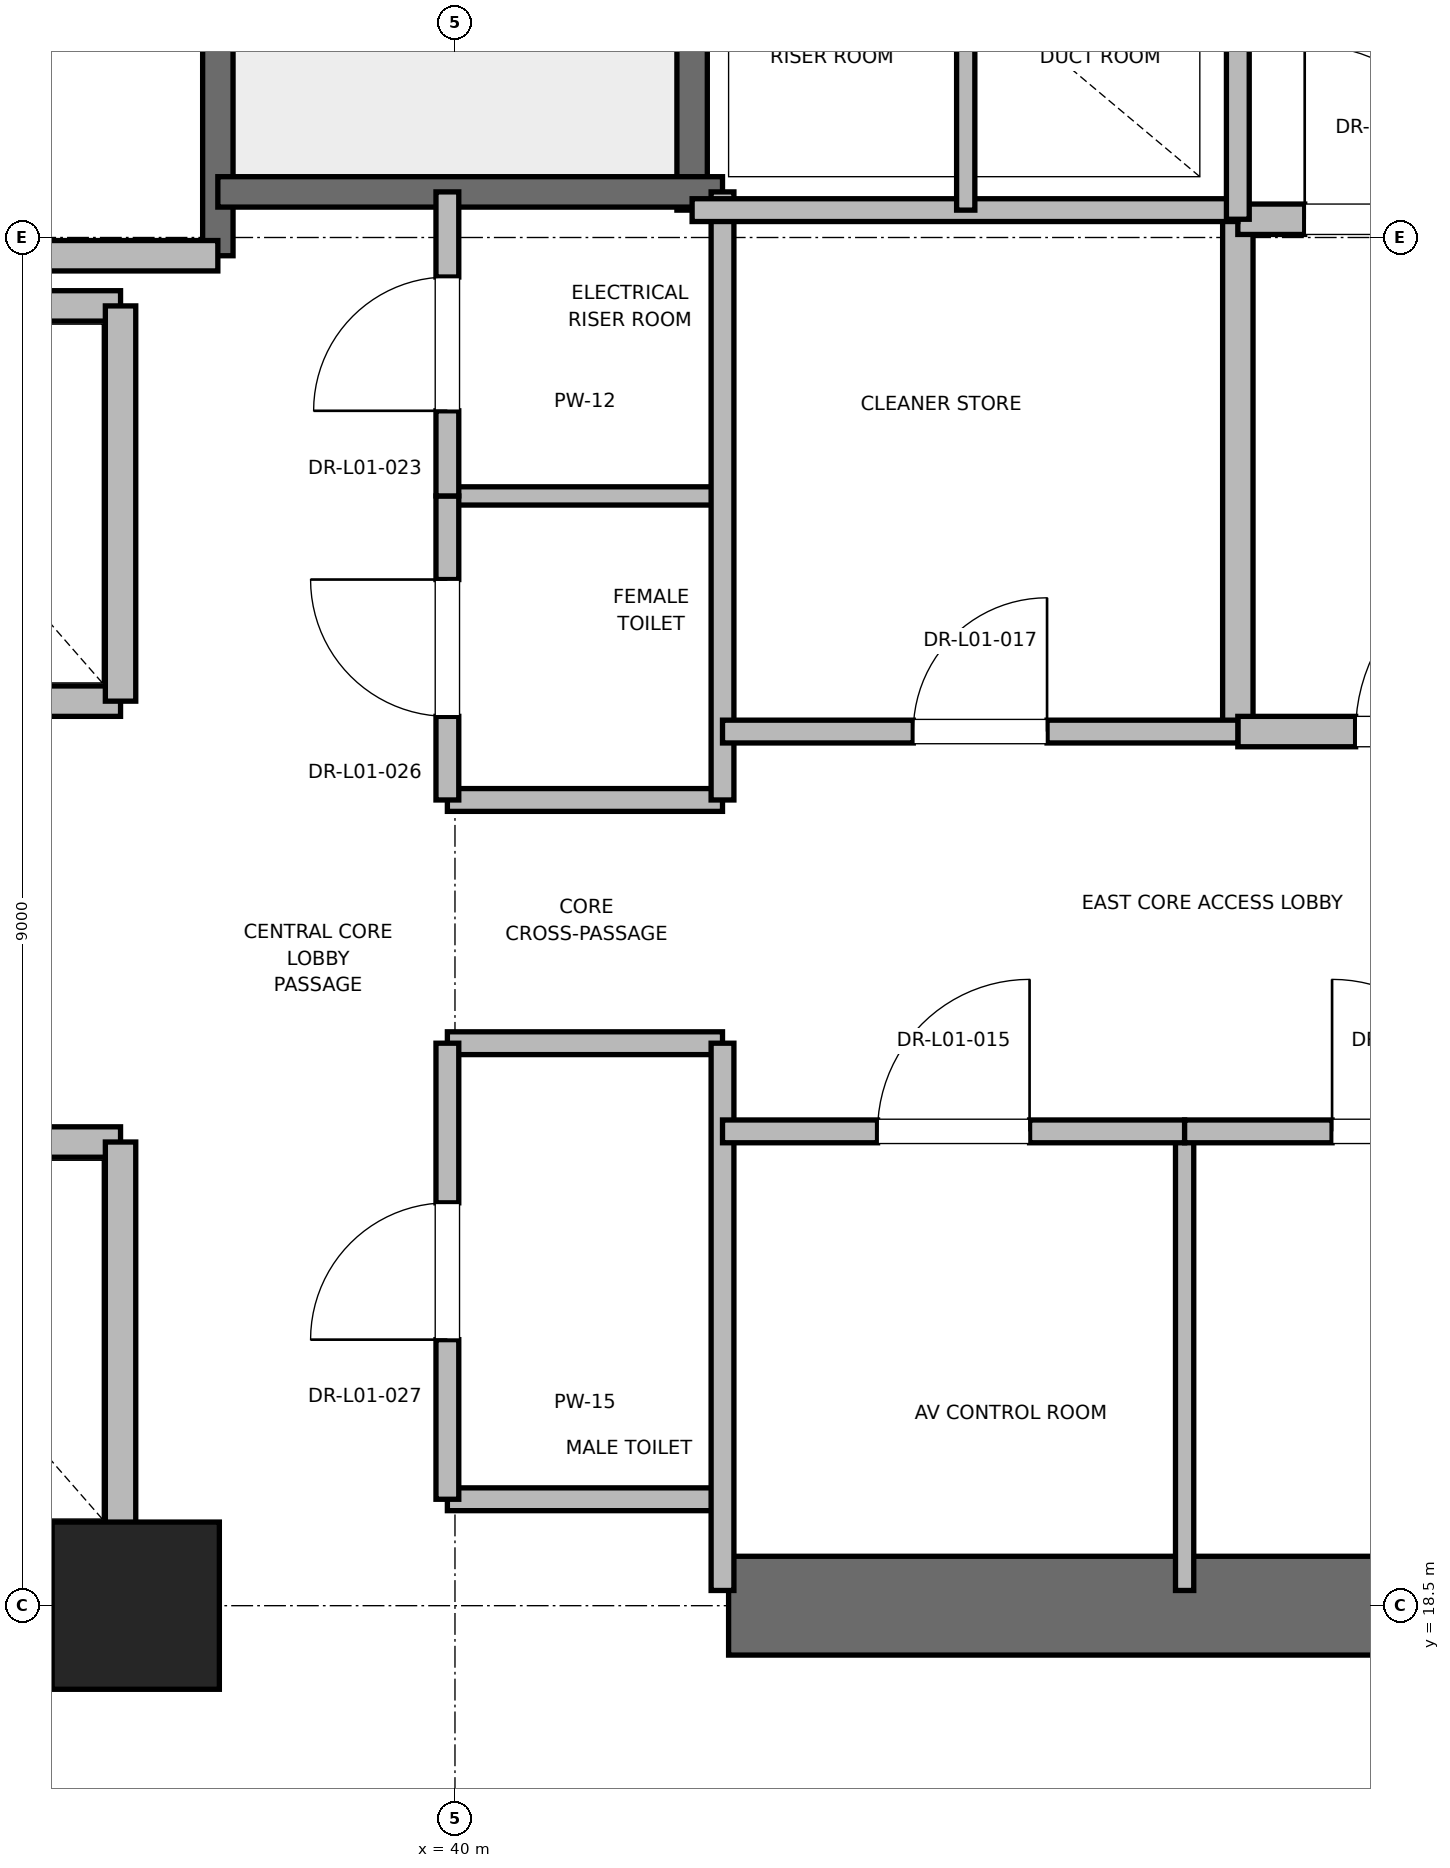
"""IFC4 building model, lengths in metres.
Left out: names, types, materials, properties, quantities, classifications, styles, units other than length and angle.
Written with IfcOpenShell. Run it as: python <this file> out.ifc"""

import sys

from ifc_helpers import new_model, si_unit, direction, frame, frame_2d, origin, origin_2d, place, context, subcontext, project, spatial, rectangle, extrude, element, fill, save


model = new_model("IFC4")
c1 = context("Model", 3, precision=1e-05, world=origin(), true_north=direction((0.0, 1.0)))
c2 = subcontext(c1, "Body", "Model", "MODEL_VIEW")
j1 = project(units=[si_unit("LENGTHUNIT", "METRE"), si_unit("PLANEANGLEUNIT", "RADIAN")], contexts=[c1])
p1 = place(None, origin())
s1 = spatial("IfcSite", under=j1, at=p1, CompositionType="ELEMENT")
p2 = place(p1, origin())
s2 = spatial("IfcBuilding", under=s1, at=p2, CompositionType="ELEMENT")
p3 = place(p2, frame((0.0, 0.0, 6.0)))
s3 = spatial("IfcBuildingStorey", under=s2, at=p3, CompositionType="ELEMENT", Elevation=6.0)
p4 = place(p3, frame((37.9, 18.5, 0.0), z_axis=(0.0, 0.0, 1.0), x_axis=(1.0, 0.0, 0.0)))
e1 = element("IfcColumn", 1, at=p4, inside=s3, PredefinedType="PILASTER", context=c2, shape_type="SweptSolid", body=[
    extrude(rectangle(XDim=1.1, YDim=1.1, at=origin_2d()), origin(), (0.0, 0.0, 1.0), 5.2),
])
for number, where, z_axis, x_axis in (
    (2, (29.0, 18.5, 0.0), (0.0, 0.0, 1.0), (1.0, 0.0, 0.0)),
    (3, (41.8, 18.5, 0.0), (0.0, 0.0, 1.0), (1.0, 0.0, 0.0)),
):
    element("IfcWall", number, at=place(p3, frame(where, z_axis=z_axis, x_axis=x_axis)), inside=s3, PredefinedType="SHEAR", context=c2, shape_type="SweptSolid", body=[
        extrude(rectangle(XDim=9.2, YDim=0.65, at=frame_2d((4.6, 0.0))), origin(), (0.0, 0.0, 1.0), 4.92),
    ])
p5 = place(p3, frame((38.44, 27.38, 0.0), z_axis=(0.0, 0.0, 1.0), x_axis=(0.0, 1.0, 0.0)))
e4 = element("IfcWall", 4, at=p5, inside=s3, PredefinedType="SOLIDWALL", context=c2, shape_type="SweptSolid", body=[
    extrude(rectangle(XDim=8.87, YDim=0.2, at=frame_2d((4.435, 0.0))), origin(), (0.0, 0.0, 1.0), 4.92),
])
p6 = place(p3, frame((41.56, 27.68, 0.0), z_axis=(0.0, 0.0, 1.0), x_axis=(0.0, 1.0, 0.0)))
e5 = element("IfcWall", 5, at=p6, inside=s3, PredefinedType="SOLIDWALL", context=c2, shape_type="SweptSolid", body=[
    extrude(rectangle(XDim=8.57, YDim=0.2, at=frame_2d((4.285, 0.0))), origin(), (0.0, 0.0, 1.0), 4.92),
])
p7 = place(p3, frame((38.44, 27.8, 0.0), z_axis=(0.0, 0.0, 1.0), x_axis=(1.0, 0.0, 0.0)))
e6 = element("IfcWall", 6, at=p7, inside=s3, PredefinedType="SOLIDWALL", context=c2, shape_type="SweptSolid", body=[
    extrude(rectangle(XDim=3.32, YDim=0.2, at=frame_2d((1.66, 0.0))), origin(), (0.0, 0.0, 1.0), 4.92),
])
p8 = place(p3, frame((32.82, 27.38, 0.0), z_axis=(0.0, 0.0, 1.0), x_axis=(1.0, 0.0, 0.0)))
e7 = element("IfcWall", 7, at=p8, inside=s3, PredefinedType="PARTITIONING", context=c2, shape_type="SweptSolid", body=[
    extrude(rectangle(XDim=5.62, YDim=0.2, at=frame_2d((2.81, 0.0))), origin(), (0.0, 0.0, 1.0), 4.92),
])
p9 = place(p3, frame((45.15, 24.25, 0.0), z_axis=(0.0, 0.0, 1.0), x_axis=(0.0, 1.0, 0.0)))
e8 = element("IfcWall", 8, at=p9, inside=s3, PredefinedType="PARTITIONING", context=c2, shape_type="SweptSolid", body=[
    extrude(rectangle(XDim=3.37, YDim=0.2, at=frame_2d((1.685, 0.0))), origin(), (0.0, 0.0, 1.0), 4.92),
])
p10 = place(p3, frame((45.15, 24.25, 0.0), z_axis=(0.0, 0.0, 1.0), x_axis=(1.0, 0.0, 0.0)))
e9 = element("IfcWall", 9, at=p10, inside=s3, PredefinedType="PARTITIONING", context=c2, shape_type="SweptSolid", body=[
    extrude(rectangle(XDim=2.7, YDim=0.2, at=frame_2d((1.35, 0.0))), origin(), (0.0, 0.0, 1.0), 4.92),
])
p11 = place(p10, frame((0.775, 0.0, 0.0)))
e10 = element("IfcOpeningElement", 10, at=p11, cuts=e9, PredefinedType="OPENING", context=c2, shape_type="SweptSolid", body=[
    extrude(rectangle(XDim=1.15, YDim=2.2, at=frame_2d((0.575, 1.1))), frame((0.0, 0.1, 0.0), z_axis=(0.0, -1.0, 0.0), x_axis=(1.0, 0.0, 0.0)), (0.0, 0.0, 1.0), 0.2),
])
p12 = place(p3, frame((45.15, 27.62, 0.0), z_axis=(0.0, 0.0, 1.0), x_axis=(1.0, 0.0, 0.0)))
e11 = element("IfcWall", 11, at=p12, inside=s3, PredefinedType="PARTITIONING", context=c2, shape_type="SweptSolid", body=[
    extrude(rectangle(XDim=2.03, YDim=0.2, at=frame_2d((1.015, 0.0))), origin(), (0.0, 0.0, 1.0), 4.92),
])
p13 = place(p12, frame((0.44, 0.0, 0.0)))
e12 = element("IfcOpeningElement", 12, at=p13, cuts=e11, PredefinedType="OPENING", context=c2, shape_type="SweptSolid", body=[
    extrude(rectangle(XDim=1.15, YDim=2.2, at=frame_2d((0.575, 1.1))), frame((0.0, 0.1, 0.0), z_axis=(0.0, -1.0, 0.0), x_axis=(1.0, 0.0, 0.0)), (0.0, 0.0, 1.0), 0.2),
])
p14 = place(p3, frame((35.5, 18.95, 0.0), z_axis=(0.0, 0.0, 1.0), x_axis=(1.0, 0.0, 0.0)))
e13 = element("IfcWall", 13, at=p14, inside=s3, PredefinedType="SOLIDWALL", context=c2, shape_type="SweptSolid", body=[
    extrude(rectangle(XDim=2.3, YDim=0.2, at=frame_2d((1.15, 0.0))), origin(), (0.0, 0.0, 1.0), 3.7),
])
p15 = place(p3, frame((37.8, 21.55, 0.0), z_axis=(0.0, 0.0, 1.0), x_axis=(-1.0, 0.0, 0.0)))
e14 = element("IfcWall", 14, at=p15, inside=s3, PredefinedType="SOLIDWALL", context=c2, shape_type="SweptSolid", body=[
    extrude(rectangle(XDim=2.3, YDim=0.2, at=frame_2d((1.15, 0.0))), origin(), (0.0, 0.0, 1.0), 4.92),
])
p16 = place(p3, frame((37.8, 18.95, 0.0), z_axis=(0.0, 0.0, 1.0), x_axis=(0.0, 1.0, 0.0)))
e15 = element("IfcWall", 15, at=p16, inside=s3, PredefinedType="SOLIDWALL", context=c2, shape_type="SweptSolid", body=[
    extrude(rectangle(XDim=2.6, YDim=0.2, at=frame_2d((1.3, 0.0))), origin(), (0.0, 0.0, 1.0), 3.7),
])
for number, where, z_axis, x_axis in (
    (16, (35.5, 24.45, 0.0), (0.0, 0.0, 1.0), (1.0, 0.0, 0.0)),
    (17, (37.8, 27.05, 0.0), (0.0, 0.0, 1.0), (-1.0, 0.0, 0.0)),
):
    element("IfcWall", number, at=place(p3, frame(where, z_axis=z_axis, x_axis=x_axis)), inside=s3, PredefinedType="SOLIDWALL", context=c2, shape_type="SweptSolid", body=[
        extrude(rectangle(XDim=2.3, YDim=0.2, at=frame_2d((1.15, 0.0))), origin(), (0.0, 0.0, 1.0), 4.92),
    ])
p17 = place(p3, frame((37.8, 24.45, 0.0), z_axis=(0.0, 0.0, 1.0), x_axis=(0.0, 1.0, 0.0)))
e18 = element("IfcWall", 18, at=p17, inside=s3, PredefinedType="SOLIDWALL", context=c2, shape_type="SweptSolid", body=[
    extrude(rectangle(XDim=2.6, YDim=0.2, at=frame_2d((1.3, 0.0))), origin(), (0.0, 0.0, 1.0), 4.92),
])
for number, where, z_axis, x_axis in (
    (19, (39.95, 19.2, 0.0), (0.0, 0.0, 1.0), (1.0, 0.0, 0.0)),
    (20, (39.95, 22.2, 0.0), (0.0, 0.0, 1.0), (1.0, 0.0, 0.0)),
    (21, (39.95, 23.8, 0.0), (0.0, 0.0, 1.0), (1.0, 0.0, 0.0)),
):
    element("IfcWall", number, at=place(p3, frame(where, z_axis=z_axis, x_axis=x_axis)), inside=s3, PredefinedType="PARTITIONING", context=c2, shape_type="SweptSolid", body=[
        extrude(rectangle(XDim=1.81, YDim=0.15, at=frame_2d((0.905, 0.0))), origin(), (0.0, 0.0, 1.0), 2.85),
    ])
p18 = place(p3, frame((39.95, 25.8, 0.0), z_axis=(0.0, 0.0, 1.0), x_axis=(1.0, 0.0, 0.0)))
e22 = element("IfcWall", 22, at=p18, inside=s3, PredefinedType="PARTITIONING", context=c2, shape_type="SweptSolid", body=[
    extrude(rectangle(XDim=1.81, YDim=0.12, at=frame_2d((0.905, 0.0))), origin(), (0.0, 0.0, 1.0), 2.85),
])
p19 = place(p3, frame((41.76, 18.6, 0.0), z_axis=(0.0, 0.0, 1.0), x_axis=(0.0, 1.0, 0.0)))
e23 = element("IfcWall", 23, at=p19, inside=s3, PredefinedType="PARTITIONING", context=c2, shape_type="SweptSolid", body=[
    extrude(rectangle(XDim=3.6, YDim=0.15, at=frame_2d((1.8, 0.0))), origin(), (0.0, 0.0, 1.0), 2.85),
])
p20 = place(p3, frame((41.76, 23.8, 0.0), z_axis=(0.0, 0.0, 1.0), x_axis=(0.0, 1.0, 0.0)))
e24 = element("IfcWall", 24, at=p20, inside=s3, PredefinedType="PARTITIONING", context=c2, shape_type="SweptSolid", body=[
    extrude(rectangle(XDim=4.0, YDim=0.15, at=frame_2d((2.0, 0.0))), origin(), (0.0, 0.0, 1.0), 2.85),
])
p21 = place(p3, frame((39.95, 19.2, 0.0), z_axis=(0.0, 0.0, 1.0), x_axis=(0.0, 1.0, 0.0)))
e25 = element("IfcWall", 25, at=p21, inside=s3, PredefinedType="PARTITIONING", context=c2, shape_type="SweptSolid", body=[
    extrude(rectangle(XDim=3.0, YDim=0.15, at=frame_2d((1.5, 0.0))), origin(), (0.0, 0.0, 1.0), 2.85),
])
p22 = place(p21, frame((1.05, 0.0, 0.0)))
e26 = element("IfcOpeningElement", 26, at=p22, cuts=e25, PredefinedType="OPENING", context=c2, shape_type="SweptSolid", body=[
    extrude(rectangle(XDim=0.9, YDim=2.1, at=frame_2d((0.45, 1.05))), frame((0.0, 0.075, 0.0), z_axis=(0.0, -1.0, 0.0), x_axis=(1.0, 0.0, 0.0)), (0.0, 0.0, 1.0), 0.15),
])
p23 = place(p3, frame((39.95, 23.8, 0.0), z_axis=(0.0, 0.0, 1.0), x_axis=(0.0, 1.0, 0.0)))
e27 = element("IfcWall", 27, at=p23, inside=s3, PredefinedType="PARTITIONING", context=c2, shape_type="SweptSolid", body=[
    extrude(rectangle(XDim=2.0, YDim=0.15, at=frame_2d((1.0, 0.0))), origin(), (0.0, 0.0, 1.0), 2.85),
])
p24 = place(p23, frame((0.55, 0.0, 0.0)))
e28 = element("IfcOpeningElement", 28, at=p24, cuts=e27, PredefinedType="OPENING", context=c2, shape_type="SweptSolid", body=[
    extrude(rectangle(XDim=0.9, YDim=2.1, at=frame_2d((0.45, 1.05))), frame((0.0, 0.075, 0.0), z_axis=(0.0, -1.0, 0.0), x_axis=(1.0, 0.0, 0.0)), (0.0, 0.0, 1.0), 0.15),
])
p25 = place(p3, frame((39.95, 25.8, 0.0), z_axis=(0.0, 0.0, 1.0), x_axis=(0.0, 1.0, 0.0)))
e29 = element("IfcWall", 29, at=p25, inside=s3, PredefinedType="PARTITIONING", context=c2, shape_type="SweptSolid", body=[
    extrude(rectangle(XDim=2.0, YDim=0.15, at=frame_2d((1.0, 0.0))), origin(), (0.0, 0.0, 1.0), 2.85),
])
p26 = place(p25, frame((0.56, 0.0, 0.0)))
e30 = element("IfcOpeningElement", 30, at=p26, cuts=e29, PredefinedType="OPENING", context=c2, shape_type="SweptSolid", body=[
    extrude(rectangle(XDim=0.88, YDim=2.1, at=frame_2d((0.44, 1.05))), frame((0.0, 0.075, 0.0), z_axis=(0.0, -1.0, 0.0), x_axis=(1.0, 0.0, 0.0)), (0.0, 0.0, 1.0), 0.15),
])
p27 = place(p3, frame((41.56, 27.68, 0.0), z_axis=(0.0, 0.0, 1.0), x_axis=(1.0, 0.0, 0.0)))
e31 = element("IfcWall", 31, at=p27, inside=s3, PredefinedType="PARTITIONING", context=c2, shape_type="SweptSolid", body=[
    extrude(rectangle(XDim=3.59, YDim=0.15, at=frame_2d((1.795, 0.0))), origin(), (0.0, 0.0, 1.0), 2.85),
])
p28 = place(p3, frame((44.8, 18.6, 0.0), z_axis=(0.0, 0.0, 1.0), x_axis=(0.0, 1.0, 0.0)))
e32 = element("IfcWall", 32, at=p28, inside=s3, PredefinedType="PARTITIONING", context=c2, shape_type="SweptSolid", body=[
    extrude(rectangle(XDim=3.02, YDim=0.12, at=frame_2d((1.51, 0.0))), origin(), (0.0, 0.0, 1.0), 2.85),
])
p29 = place(p3, frame((41.76, 21.62, 0.0), z_axis=(0.0, 0.0, 1.0), x_axis=(1.0, 0.0, 0.0)))
e33 = element("IfcWall", 33, at=p29, inside=s3, PredefinedType="PARTITIONING", context=c2, shape_type="SweptSolid", body=[
    extrude(rectangle(XDim=3.04, YDim=0.15, at=frame_2d((1.52, 0.0))), origin(), (0.0, 0.0, 1.0), 2.85),
])
p30 = place(p29, frame((1.02, 0.0, 0.0)))
e34 = element("IfcOpeningElement", 34, at=p30, cuts=e33, PredefinedType="OPENING", context=c2, shape_type="SweptSolid", body=[
    extrude(rectangle(XDim=1.0, YDim=2.15, at=frame_2d((0.5, 1.075))), frame((0.0, 0.075, 0.0), z_axis=(0.0, -1.0, 0.0), x_axis=(1.0, 0.0, 0.0)), (0.0, 0.0, 1.0), 0.15),
])
p31 = place(p3, frame((44.8, 21.62, 0.0), z_axis=(0.0, 0.0, 1.0), x_axis=(1.0, 0.0, 0.0)))
e35 = element("IfcWall", 35, at=p31, inside=s3, PredefinedType="PARTITIONING", context=c2, shape_type="SweptSolid", body=[
    extrude(rectangle(XDim=2.94, YDim=0.15, at=frame_2d((1.47, 0.0))), origin(), (0.0, 0.0, 1.0), 2.85),
])
p32 = place(p31, frame((0.97, 0.0, 0.0)))
e36 = element("IfcOpeningElement", 36, at=p32, cuts=e35, PredefinedType="OPENING", context=c2, shape_type="SweptSolid", body=[
    extrude(rectangle(XDim=1.0, YDim=2.15, at=frame_2d((0.5, 1.075))), frame((0.0, 0.075, 0.0), z_axis=(0.0, -1.0, 0.0), x_axis=(1.0, 0.0, 0.0)), (0.0, 0.0, 1.0), 0.15),
])
p33 = place(p3, frame((41.76, 24.25, 0.0), z_axis=(0.0, 0.0, 1.0), x_axis=(1.0, 0.0, 0.0)))
e37 = element("IfcWall", 37, at=p33, inside=s3, PredefinedType="PARTITIONING", context=c2, shape_type="SweptSolid", body=[
    extrude(rectangle(XDim=3.39, YDim=0.15, at=frame_2d((1.695, 0.0))), origin(), (0.0, 0.0, 1.0), 2.85),
])
p34 = place(p33, frame((1.255, 0.0, 0.0)))
e38 = element("IfcOpeningElement", 38, at=p34, cuts=e37, PredefinedType="OPENING", context=c2, shape_type="SweptSolid", body=[
    extrude(rectangle(XDim=0.88, YDim=2.1, at=frame_2d((0.44, 1.05))), frame((0.0, 0.075, 0.0), z_axis=(0.0, -1.0, 0.0), x_axis=(1.0, 0.0, 0.0)), (0.0, 0.0, 1.0), 0.15),
])
p35 = place(p3, frame((45.15, 27.62, 0.0), z_axis=(0.0, 0.0, 1.0), x_axis=(0.0, 1.0, 0.0)))
e39 = element("IfcWall", 39, at=p35, inside=s3, PredefinedType="PARTITIONING", context=c2, shape_type="SweptSolid", body=[
    extrude(rectangle(XDim=3.1, YDim=0.15, at=frame_2d((1.55, 0.0))), origin(), (0.0, 0.0, 1.0), 2.85),
])
p36 = place(p3, frame((43.36, 27.68, 0.0), z_axis=(0.0, 0.0, 1.0), x_axis=(0.0, 1.0, 0.0)))
e40 = element("IfcWall", 40, at=p36, inside=s3, PredefinedType="PARTITIONING", context=c2, shape_type="SweptSolid", body=[
    extrude(rectangle(XDim=3.04, YDim=0.12, at=frame_2d((1.52, 0.0))), origin(), (0.0, 0.0, 1.0), 2.85),
])
p37 = place(p11, origin())
e41 = element("IfcDoor", 41, at=p37, inside=s3, OperationType="SINGLE_SWING_RIGHT", PredefinedType="DOOR", context=c2, shape_type="SweptSolid", body=[
    extrude(rectangle(XDim=1.15, YDim=2.2, at=frame_2d((0.575, 1.1))), frame((0.0, 0.025, 0.0), z_axis=(0.0, -1.0, 0.0), x_axis=(1.0, 0.0, 0.0)), (0.0, 0.0, 1.0), 0.05),
])
fill(e10, e41)
p38 = place(p13, origin())
e42 = element("IfcDoor", 42, at=p38, inside=s3, OperationType="SINGLE_SWING_LEFT", PredefinedType="DOOR", context=c2, shape_type="SweptSolid", body=[
    extrude(rectangle(XDim=1.15, YDim=2.2, at=frame_2d((0.575, 1.1))), frame((0.0, 0.025, 0.0), z_axis=(0.0, -1.0, 0.0), x_axis=(1.0, 0.0, 0.0)), (0.0, 0.0, 1.0), 0.05),
])
fill(e12, e42)
p39 = place(p22, origin())
e43 = element("IfcDoor", 43, at=p39, inside=s3, OperationType="SINGLE_SWING_LEFT", PredefinedType="DOOR", context=c2, shape_type="SweptSolid", body=[
    extrude(rectangle(XDim=0.9, YDim=2.1, at=frame_2d((0.45, 1.05))), frame((0.0, 0.025, 0.0), z_axis=(0.0, -1.0, 0.0), x_axis=(1.0, 0.0, 0.0)), (0.0, 0.0, 1.0), 0.05),
])
fill(e26, e43)
p40 = place(p24, origin())
e44 = element("IfcDoor", 44, at=p40, inside=s3, OperationType="SINGLE_SWING_RIGHT", PredefinedType="DOOR", context=c2, shape_type="SweptSolid", body=[
    extrude(rectangle(XDim=0.9, YDim=2.1, at=frame_2d((0.45, 1.05))), frame((0.0, 0.025, 0.0), z_axis=(0.0, -1.0, 0.0), x_axis=(1.0, 0.0, 0.0)), (0.0, 0.0, 1.0), 0.05),
])
fill(e28, e44)
p41 = place(p26, origin())
e45 = element("IfcDoor", 45, at=p41, inside=s3, OperationType="SINGLE_SWING_LEFT", PredefinedType="DOOR", context=c2, shape_type="SweptSolid", body=[
    extrude(rectangle(XDim=0.88, YDim=2.1, at=frame_2d((0.44, 1.05))), frame((0.0, 0.025, 0.0), z_axis=(0.0, -1.0, 0.0), x_axis=(1.0, 0.0, 0.0)), (0.0, 0.0, 1.0), 0.05),
])
fill(e30, e45)
p42 = place(p30, origin())
e46 = element("IfcDoor", 46, at=p42, inside=s3, OperationType="SINGLE_SWING_RIGHT", PredefinedType="DOOR", context=c2, shape_type="SweptSolid", body=[
    extrude(rectangle(XDim=1.0, YDim=2.15, at=frame_2d((0.5, 1.075))), frame((0.0, 0.025, 0.0), z_axis=(0.0, -1.0, 0.0), x_axis=(1.0, 0.0, 0.0)), (0.0, 0.0, 1.0), 0.05),
])
fill(e34, e46)
p43 = place(p32, origin())
e47 = element("IfcDoor", 47, at=p43, inside=s3, OperationType="SINGLE_SWING_LEFT", PredefinedType="DOOR", context=c2, shape_type="SweptSolid", body=[
    extrude(rectangle(XDim=1.0, YDim=2.15, at=frame_2d((0.5, 1.075))), frame((0.0, 0.025, 0.0), z_axis=(0.0, -1.0, 0.0), x_axis=(1.0, 0.0, 0.0)), (0.0, 0.0, 1.0), 0.05),
])
fill(e36, e47)
p44 = place(p34, origin())
e48 = element("IfcDoor", 48, at=p44, inside=s3, OperationType="SINGLE_SWING_RIGHT", PredefinedType="DOOR", context=c2, shape_type="SweptSolid", body=[
    extrude(rectangle(XDim=0.88, YDim=2.1, at=frame_2d((0.44, 1.05))), frame((0.0, 0.025, 0.0), z_axis=(0.0, -1.0, 0.0), x_axis=(1.0, 0.0, 0.0)), (0.0, 0.0, 1.0), 0.05),
])
fill(e38, e48)
save(model, sys.argv[1])
